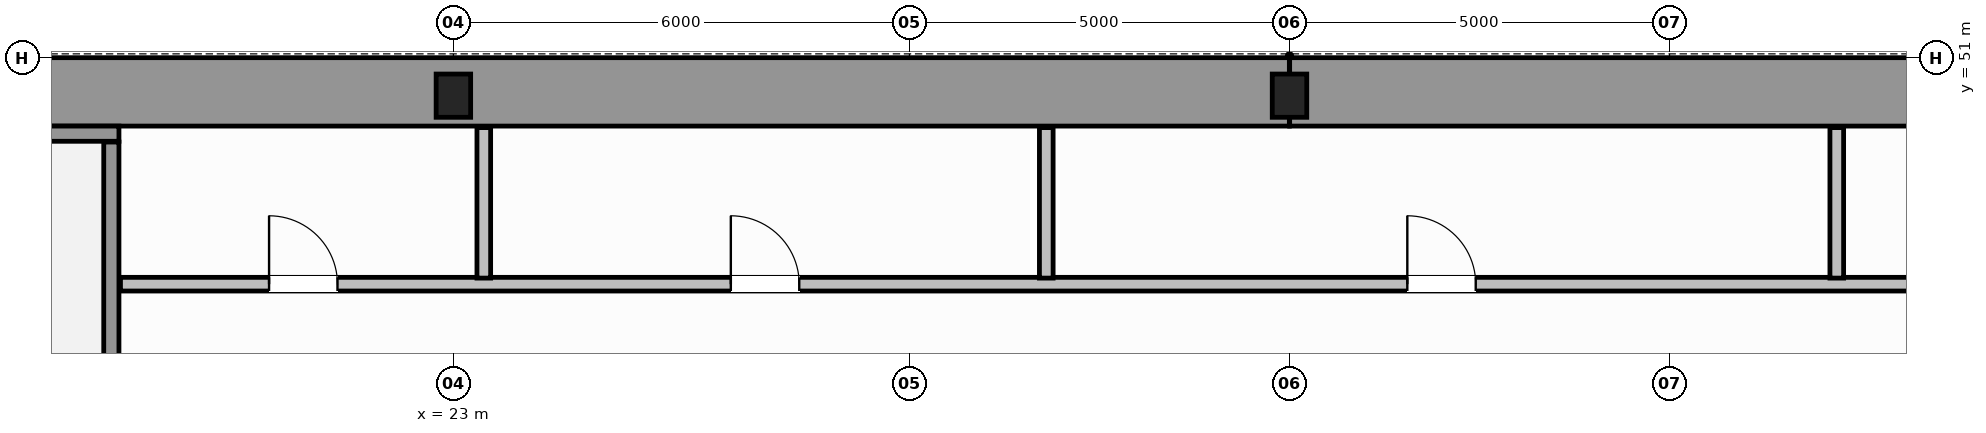
"""IFC4 building model, lengths in metres.
Left out: names, types, materials, properties, quantities, classifications, styles, units other than length and angle.
Written with IfcOpenShell. Run it as: python <this file> out.ifc"""

import sys

from ifc_helpers import new_model, si_unit, direction, frame, frame_2d, origin, origin_2d, place, context, subcontext, project, spatial, rectangle, i_section, extrude, source, transform, mapped, element, fill, save


model = new_model("IFC4")
c1 = context("Model", 3, precision=1e-05, world=origin(), true_north=direction((0.0, 1.0)))
c2 = subcontext(c1, "Body", "Model", "MODEL_VIEW")
j1 = project(units=[si_unit("LENGTHUNIT", "METRE"), si_unit("PLANEANGLEUNIT", "RADIAN")], contexts=[c1])
p1 = place(None, origin())
s1 = spatial("IfcSite", under=j1, at=p1, CompositionType="ELEMENT")
p2 = place(p1, origin())
s2 = spatial("IfcBuilding", under=s1, at=p2, CompositionType="ELEMENT")
p3 = place(p2, frame((0.0, 0.0, 68.2)))
s3 = spatial("IfcBuildingStorey", under=s2, at=p3, CompositionType="ELEMENT", Elevation=68.2)
m1 = source(origin(), c2, "Body", "SweptSolid", [
    extrude(i_section(OverallWidth=0.454, OverallDepth=0.569, WebThickness=0.078, FlangeThickness=0.08, FilletRadius=0.015, at=origin_2d()), origin(), (0.0, 0.0, 1.0), 3.8),
])
for number, where, z_axis, x_axis in (
    (1, (23.0, 50.5, 0.0), (0.0, 0.0, 1.0), (1.0, 0.0, 0.0)),
    (2, (34.0, 50.5, 0.0), (0.0, 0.0, 1.0), (1.0, 0.0, 0.0)),
):
    element("IfcColumn", number, at=place(p3, frame(where, z_axis=z_axis, x_axis=x_axis)), inside=s3, PredefinedType="COLUMN", context=c2, shape_type="MappedRepresentation", body=[
        mapped(m1, transform((0.0, 0.0, 0.0), scale=1.0)),
    ])
for number, where, z_axis, x_axis in (
    (3, (14.454, 50.55, 0.0), (0.0, 0.0, 1.0), (1.0, 0.0, 0.0)),
    (4, (34.002, 50.55, 0.0), (0.0, 0.0, 1.0), (1.0, 0.0, 0.0)),
):
    element("IfcWall", number, at=place(p3, frame(where, z_axis=z_axis, x_axis=x_axis)), inside=s3, PredefinedType="SHEAR", context=c2, shape_type="SweptSolid", body=[
        extrude(rectangle(XDim=19.544, YDim=0.9, at=frame_2d((9.772, 0.0))), origin(), (0.0, 0.0, 1.0), 3.8),
    ])
p4 = place(p3, frame((14.45, 50.0, 0.0), z_axis=(0.0, 0.0, 1.0), x_axis=(1.0, 0.0, 0.0)))
e5 = element("IfcWall", 5, at=p4, inside=s3, PredefinedType="SOLIDWALL", context=c2, shape_type="SweptSolid", body=[
    extrude(rectangle(XDim=4.15, YDim=0.2, at=frame_2d((2.075, 0.0))), origin(), (0.0, 0.0, 1.0), 3.8),
])
p5 = place(p3, frame((18.5, 39.96, 0.0), z_axis=(0.0, 0.0, 1.0), x_axis=(0.0, 1.0, 0.0)))
e6 = element("IfcWall", 6, at=p5, inside=s3, PredefinedType="SOLIDWALL", context=c2, shape_type="SweptSolid", body=[
    extrude(rectangle(XDim=9.93, YDim=0.2, at=frame_2d((4.965, 0.0))), origin(), (0.0, 0.0, 1.0), 3.8),
])
p6 = place(p3, frame((18.62, 48.02, 0.0), z_axis=(0.0, 0.0, 1.0), x_axis=(1.0, 0.0, 0.0)))
e7 = element("IfcWall", 7, at=p6, inside=s3, PredefinedType="PLUMBINGWALL", context=c2, shape_type="SweptSolid", body=[
    extrude(rectangle(XDim=30.76, YDim=0.18, at=frame_2d((15.38, 0.0))), origin(), (0.0, 0.0, 1.0), 3.58),
])
p7 = place(p6, frame((1.955, 0.0, 0.0)))
e8 = element("IfcOpeningElement", 8, at=p7, cuts=e7, PredefinedType="OPENING", context=c2, shape_type="SweptSolid", body=[
    extrude(rectangle(XDim=0.9, YDim=2.15, at=frame_2d((0.45, 1.075))), frame((0.0, 0.1, 0.0), z_axis=(0.0, -1.0, 0.0), x_axis=(1.0, 0.0, 0.0)), (0.0, 0.0, 1.0), 0.2),
])
p8 = place(p6, frame((8.03, 0.0, 0.0)))
e9 = element("IfcOpeningElement", 9, at=p8, cuts=e7, PredefinedType="OPENING", context=c2, shape_type="SweptSolid", body=[
    extrude(rectangle(XDim=0.9, YDim=2.15, at=frame_2d((0.45, 1.075))), frame((0.0, 0.1, 0.0), z_axis=(0.0, -1.0, 0.0), x_axis=(1.0, 0.0, 0.0)), (0.0, 0.0, 1.0), 0.2),
])
p9 = place(p6, frame((16.93, 0.0, 0.0)))
e10 = element("IfcOpeningElement", 10, at=p9, cuts=e7, PredefinedType="OPENING", context=c2, shape_type="SweptSolid", body=[
    extrude(rectangle(XDim=0.9, YDim=2.15, at=frame_2d((0.45, 1.075))), frame((0.0, 0.1, 0.0), z_axis=(0.0, -1.0, 0.0), x_axis=(1.0, 0.0, 0.0)), (0.0, 0.0, 1.0), 0.2),
])
p10 = place(p6, frame((26.205, 0.0, 0.0)))
e11 = element("IfcOpeningElement", 11, at=p10, cuts=e7, PredefinedType="OPENING", context=c2, shape_type="SweptSolid", body=[
    extrude(rectangle(XDim=0.9, YDim=2.15, at=frame_2d((0.45, 1.075))), frame((0.0, 0.1, 0.0), z_axis=(0.0, -1.0, 0.0), x_axis=(1.0, 0.0, 0.0)), (0.0, 0.0, 1.0), 0.2),
])
for number, where, z_axis, x_axis in (
    (12, (23.4, 48.1, 0.0), (0.0, 0.0, 1.0), (0.0, 1.0, 0.0)),
    (13, (30.8, 48.1, 0.0), (0.0, 0.0, 1.0), (0.0, 1.0, 0.0)),
    (14, (41.2, 48.1, 0.0), (0.0, 0.0, 1.0), (0.0, 1.0, 0.0)),
):
    element("IfcWall", number, at=place(p3, frame(where, z_axis=z_axis, x_axis=x_axis)), inside=s3, PredefinedType="PLUMBINGWALL", context=c2, shape_type="SweptSolid", body=[
        extrude(rectangle(XDim=1.98, YDim=0.18, at=frame_2d((0.99, 0.0))), origin(), (0.0, 0.0, 1.0), 3.58),
    ])
m2 = source(origin(), c2, "Body", "SweptSolid", [
    extrude(rectangle(XDim=0.9, YDim=2.15, at=frame_2d((0.45, 1.075))), frame((0.0, 0.025, 0.0), z_axis=(0.0, -1.0, 0.0), x_axis=(1.0, 0.0, 0.0)), (0.0, 0.0, 1.0), 0.05),
])
p11 = place(p7, origin())
e15 = element("IfcDoor", 15, at=p11, inside=s3, OperationType="SINGLE_SWING_LEFT", PredefinedType="DOOR", context=c2, shape_type="MappedRepresentation", body=[
    mapped(m2, transform((0.0, 0.0, 0.0), scale=1.0)),
])
fill(e8, e15)
p12 = place(p8, origin())
e16 = element("IfcDoor", 16, at=p12, inside=s3, OperationType="SINGLE_SWING_RIGHT", PredefinedType="DOOR", context=c2, shape_type="MappedRepresentation", body=[
    mapped(m2, transform((0.0, 0.0, 0.0), scale=1.0)),
])
fill(e9, e16)
p13 = place(p9, origin())
e17 = element("IfcDoor", 17, at=p13, inside=s3, OperationType="SINGLE_SWING_LEFT", PredefinedType="DOOR", context=c2, shape_type="MappedRepresentation", body=[
    mapped(m2, transform((0.0, 0.0, 0.0), scale=1.0)),
])
fill(e10, e17)
save(model, sys.argv[1])
